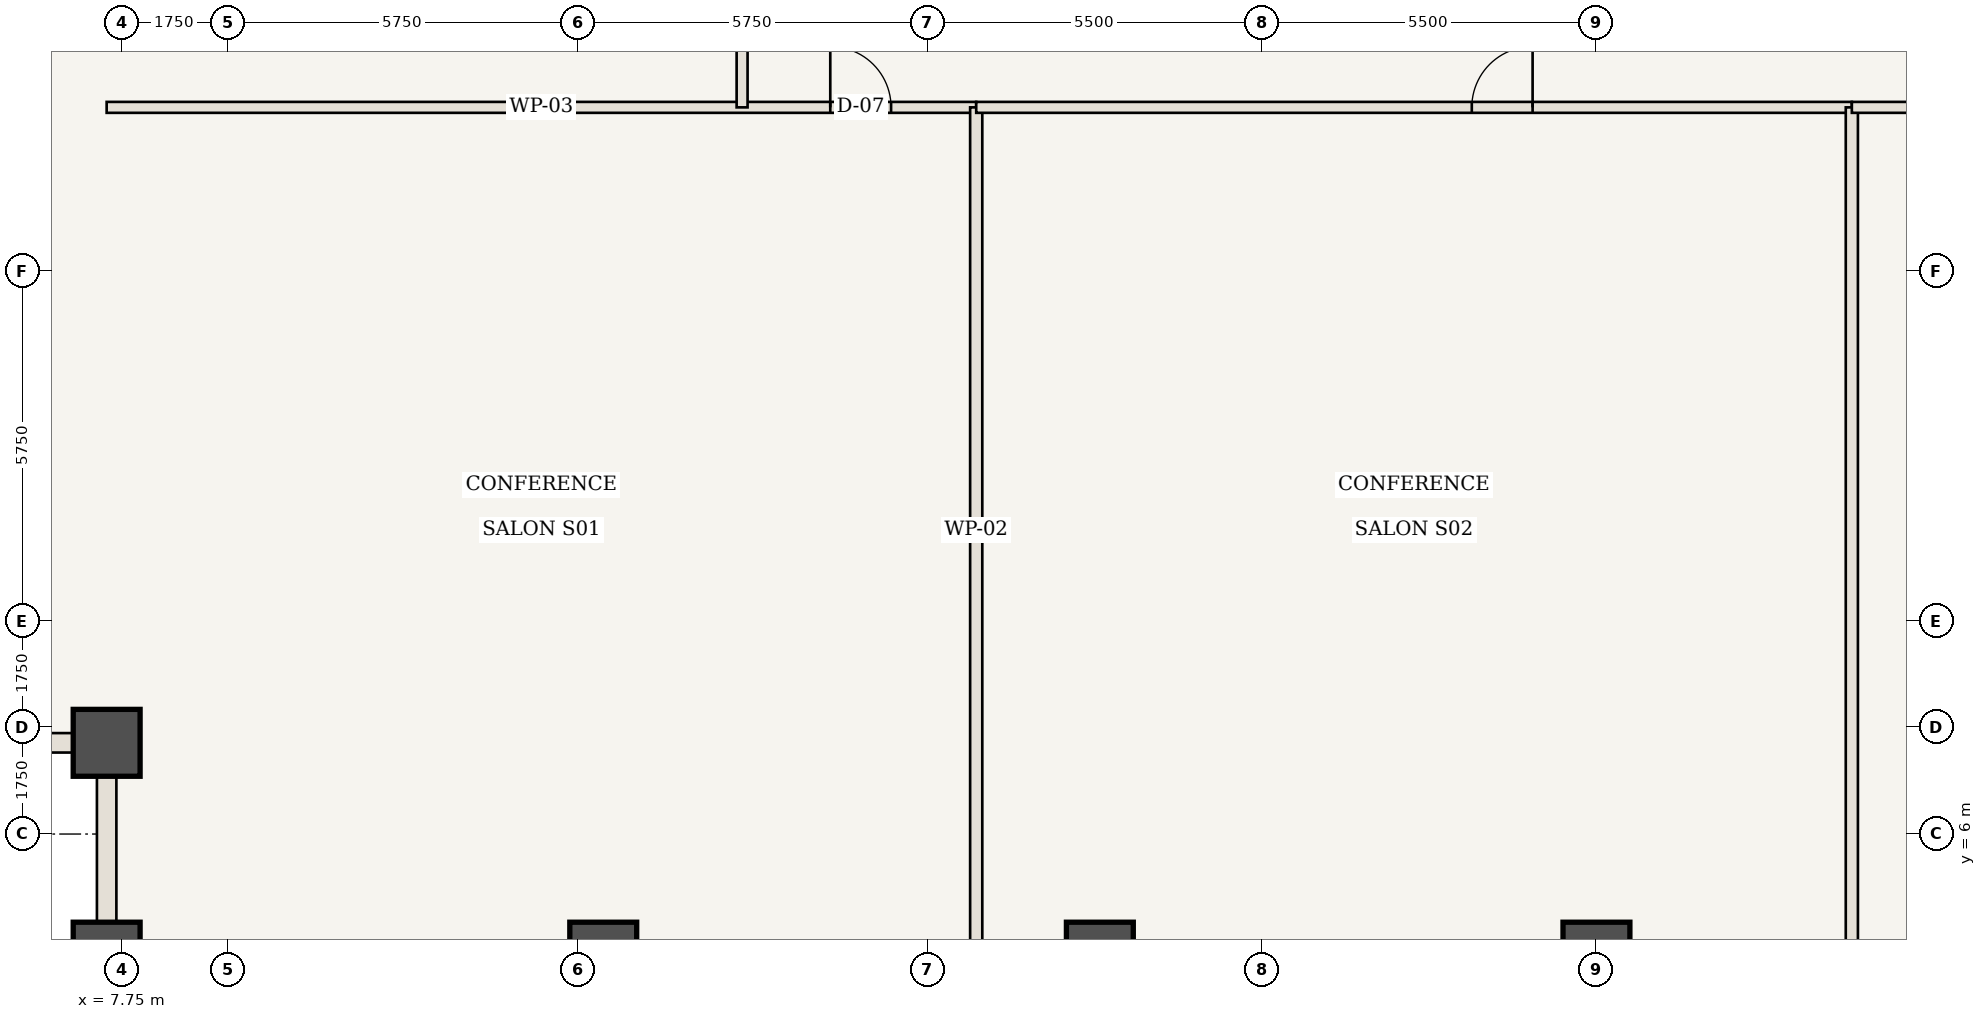
"""IFC4 building model, lengths in metres.
Left out: names, types, materials, properties, quantities, classifications, styles, units other than length and angle.
Written with IfcOpenShell. Run it as: python <this file> out.ifc"""

import sys

from ifc_helpers import new_model, si_unit, direction, frame, frame_2d, origin, origin_2d, place, context, subcontext, project, spatial, rectangle, extrude, element, fill, save


model = new_model("IFC4")
c1 = context("Model", 3, precision=1e-05, world=origin(), true_north=direction((0.0, 1.0)))
c2 = subcontext(c1, "Body", "Model", "MODEL_VIEW")
j1 = project(units=[si_unit("LENGTHUNIT", "METRE"), si_unit("PLANEANGLEUNIT", "RADIAN")], contexts=[c1])
p1 = place(None, origin())
s1 = spatial("IfcSite", under=j1, at=p1, CompositionType="ELEMENT")
p2 = place(p1, origin())
s2 = spatial("IfcBuilding", under=s1, at=p2, CompositionType="ELEMENT")
p3 = place(p2, frame((0.0, 0.0, 66.85)))
s3 = spatial("IfcBuildingStorey", under=s2, at=p3, CompositionType="ELEMENT", Elevation=66.85)
for number, where, z_axis, x_axis in (
    (1, (7.5, 4.0, 0.0), (0.0, 0.0, 1.0), (1.0, 0.0, 0.0)),
    (2, (7.5, 7.5, 0.0), (0.0, 0.0, 1.0), (1.0, 0.0, 0.0)),
    (3, (15.667, 4.0, 0.0), (0.0, 0.0, 1.0), (1.0, 0.0, 0.0)),
    (4, (23.833, 4.0, 0.0), (0.0, 0.0, 1.0), (1.0, 0.0, 0.0)),
    (5, (32.0, 4.0, 0.0), (0.0, 0.0, 1.0), (1.0, 0.0, 0.0)),
):
    element("IfcColumn", number, at=place(p3, frame(where, z_axis=z_axis, x_axis=x_axis)), inside=s3, PredefinedType="COLUMN", context=c2, shape_type="SweptSolid", body=[
        extrude(rectangle(XDim=1.1, YDim=1.1, at=origin_2d()), origin(), (0.0, 0.0, 1.0), 3.5),
    ])
p4 = place(p3, frame((7.5, 17.95, 0.0), z_axis=(0.0, 0.0, 1.0), x_axis=(1.0, 0.0, 0.0)))
e6 = element("IfcWall", 6, at=p4, inside=s3, PredefinedType="STANDARD", context=c2, shape_type="SweptSolid", body=[
    extrude(rectangle(XDim=14.3, YDim=0.18, at=frame_2d((7.15, 0.0))), origin(), (0.0, 0.0, 1.0), 3.32),
])
p5 = place(p4, frame((11.9, 0.0, 0.0)))
e7 = element("IfcOpeningElement", 7, at=p5, cuts=e6, PredefinedType="OPENING", context=c2, shape_type="SweptSolid", body=[
    extrude(rectangle(XDim=1.0, YDim=2.15, at=frame_2d((0.5, 1.075))), frame((0.0, 0.1, 0.0), z_axis=(0.0, -1.0, 0.0), x_axis=(1.0, 0.0, 0.0)), (0.0, 0.0, 1.0), 0.2),
])
p6 = place(p3, frame((21.8, 4.06, 0.0), z_axis=(0.0, 0.0, 1.0), x_axis=(0.0, 1.0, 0.0)))
e8 = element("IfcWall", 8, at=p6, inside=s3, PredefinedType="STANDARD", context=c2, shape_type="SweptSolid", body=[
    extrude(rectangle(XDim=13.89, YDim=0.2, at=frame_2d((6.945, 0.0))), origin(), (0.0, 0.0, 1.0), 3.32),
])
p7 = place(p3, frame((21.8, 17.95, 0.0), z_axis=(0.0, 0.0, 1.0), x_axis=(1.0, 0.0, 0.0)))
e9 = element("IfcWall", 9, at=p7, inside=s3, PredefinedType="STANDARD", context=c2, shape_type="SweptSolid", body=[
    extrude(rectangle(XDim=14.4, YDim=0.18, at=frame_2d((7.2, 0.0))), origin(), (0.0, 0.0, 1.0), 3.32),
])
p8 = place(p7, frame((8.15, 0.0, 0.0)))
e10 = element("IfcOpeningElement", 10, at=p8, cuts=e9, PredefinedType="OPENING", context=c2, shape_type="SweptSolid", body=[
    extrude(rectangle(XDim=1.0, YDim=2.15, at=frame_2d((0.5, 1.075))), frame((0.0, 0.1, 0.0), z_axis=(0.0, -1.0, 0.0), x_axis=(1.0, 0.0, 0.0)), (0.0, 0.0, 1.0), 0.2),
])
p9 = place(p3, frame((36.2, 4.06, 0.0), z_axis=(0.0, 0.0, 1.0), x_axis=(0.0, 1.0, 0.0)))
e11 = element("IfcWall", 11, at=p9, inside=s3, PredefinedType="STANDARD", context=c2, shape_type="SweptSolid", body=[
    extrude(rectangle(XDim=13.89, YDim=0.2, at=frame_2d((6.945, 0.0))), origin(), (0.0, 0.0, 1.0), 3.32),
])
p10 = place(p3, frame((36.2, 17.95, 0.0), z_axis=(0.0, 0.0, 1.0), x_axis=(1.0, 0.0, 0.0)))
e12 = element("IfcWall", 12, at=p10, inside=s3, PredefinedType="STANDARD", context=c2, shape_type="SweptSolid", body=[
    extrude(rectangle(XDim=20.3, YDim=0.18, at=frame_2d((10.15, 0.0))), origin(), (0.0, 0.0, 1.0), 3.32),
])
p11 = place(p10, frame((4.4, 0.0, 0.0)))
e13 = element("IfcOpeningElement", 13, at=p11, cuts=e12, PredefinedType="OPENING", context=c2, shape_type="SweptSolid", body=[
    extrude(rectangle(XDim=1.0, YDim=2.15, at=frame_2d((0.5, 1.075))), frame((0.0, 0.1, 0.0), z_axis=(0.0, -1.0, 0.0), x_axis=(1.0, 0.0, 0.0)), (0.0, 0.0, 1.0), 0.2),
])
p12 = place(p3, frame((17.95, 17.95, 0.0), z_axis=(0.0, 0.0, 1.0), x_axis=(0.0, 1.0, 0.0)))
e14 = element("IfcWall", 14, at=p12, inside=s3, PredefinedType="STANDARD", context=c2, shape_type="SweptSolid", body=[
    extrude(rectangle(XDim=15.55, YDim=0.18, at=frame_2d((7.775, 0.0))), origin(), (0.0, 0.0, 1.0), 3.32),
])
p13 = place(p12, frame((7.275, 0.0, 0.0)))
e15 = element("IfcOpeningElement", 15, at=p13, cuts=e14, PredefinedType="OPENING", context=c2, shape_type="SweptSolid", body=[
    extrude(rectangle(XDim=1.0, YDim=2.15, at=frame_2d((0.5, 1.075))), frame((0.0, 0.1, 0.0), z_axis=(0.0, -1.0, 0.0), x_axis=(1.0, 0.0, 0.0)), (0.0, 0.0, 1.0), 0.2),
])
for number, where, z_axis, x_axis in (
    (16, (7.5, 4.0, 0.0), (0.0, 0.0, 1.0), (0.0, 1.0, 0.0)),
    (17, (7.5, 7.5, 0.0), (0.0, 0.0, 1.0), (-1.0, 0.0, 0.0)),
):
    element("IfcWall", number, at=place(p3, frame(where, z_axis=z_axis, x_axis=x_axis)), inside=s3, PredefinedType="USERDEFINED", context=c2, shape_type="SweptSolid", body=[
        extrude(rectangle(XDim=3.5, YDim=0.32, at=frame_2d((1.75, 0.0))), origin(), (0.0, 0.0, 1.0), 2.52),
    ])
p14 = place(p5, origin())
e18 = element("IfcDoor", 18, at=p14, inside=s3, OperationType="SINGLE_SWING_LEFT", PredefinedType="DOOR", context=c2, shape_type="SweptSolid", body=[
    extrude(rectangle(XDim=1.0, YDim=2.15, at=frame_2d((0.5, 1.075))), frame((0.0, 0.025, 0.0), z_axis=(0.0, -1.0, 0.0), x_axis=(1.0, 0.0, 0.0)), (0.0, 0.0, 1.0), 0.05),
])
fill(e7, e18)
p15 = place(p8, origin())
e19 = element("IfcDoor", 19, at=p15, inside=s3, OperationType="SINGLE_SWING_RIGHT", PredefinedType="DOOR", context=c2, shape_type="SweptSolid", body=[
    extrude(rectangle(XDim=1.0, YDim=2.15, at=frame_2d((0.5, 1.075))), frame((0.0, 0.025, 0.0), z_axis=(0.0, -1.0, 0.0), x_axis=(1.0, 0.0, 0.0)), (0.0, 0.0, 1.0), 0.05),
])
fill(e10, e19)
save(model, sys.argv[1])
